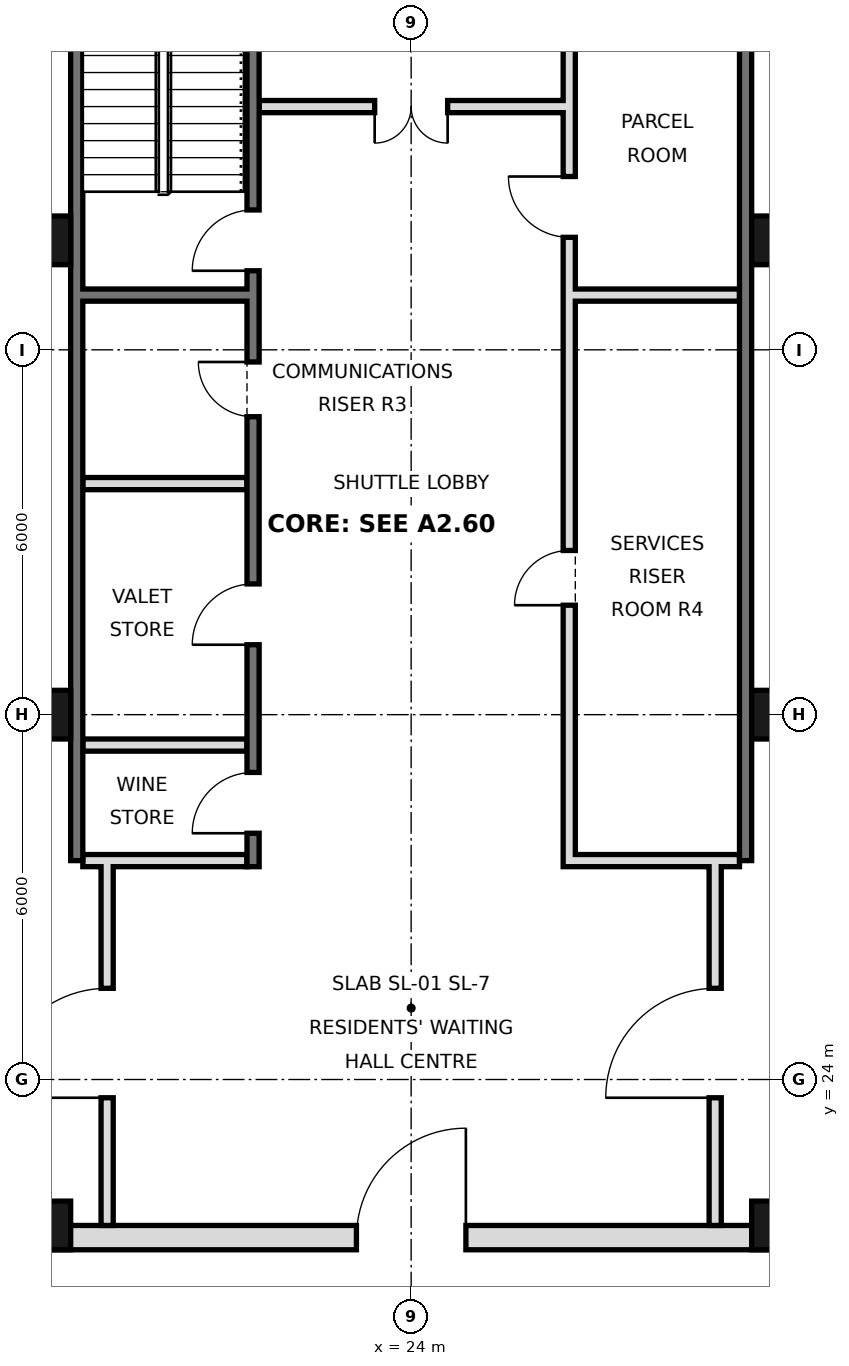
"""IFC4 building model, lengths in metres.
Left out: names, types, materials, properties, quantities, classifications, styles, units other than length and angle.
Written with IfcOpenShell. Run it as: python <this file> out.ifc"""

import sys

from ifc_helpers import new_model, si_unit, direction, frame, frame_2d, origin, origin_2d, place, context, subcontext, project, spatial, rectangle, hollow_rectangle, extrude, element, fill, save


model = new_model("IFC4")
c1 = context("Model", 3, precision=1e-05, world=origin(), true_north=direction((0.0, 1.0)))
c2 = subcontext(c1, "Body", "Model", "MODEL_VIEW")
j1 = project(units=[si_unit("LENGTHUNIT", "METRE"), si_unit("PLANEANGLEUNIT", "RADIAN")], contexts=[c1])
p1 = place(None, origin())
s1 = spatial("IfcSite", under=j1, at=p1, CompositionType="ELEMENT")
p2 = place(p1, origin())
s2 = spatial("IfcBuilding", under=s1, at=p2, CompositionType="ELEMENT")
p3 = place(p2, frame((0.0, 0.0, 239.6)))
s3 = spatial("IfcBuildingStorey", under=s2, at=p3, CompositionType="ELEMENT", Elevation=239.6)
for number, where, z_axis, x_axis in (
    (1, (18.0, 21.6, 0.0), (0.0, 0.0, 1.0), (1.0, 0.0, 0.0)),
    (2, (18.0, 30.0, 0.0), (0.0, 0.0, 1.0), (1.0, 0.0, 0.0)),
    (3, (18.0, 37.8, 0.0), (0.0, 0.0, 1.0), (1.0, 0.0, 0.0)),
    (4, (30.0, 21.6, 0.0), (0.0, 0.0, 1.0), (1.0, 0.0, 0.0)),
    (5, (30.0, 30.0, 0.0), (0.0, 0.0, 1.0), (1.0, 0.0, 0.0)),
    (6, (30.0, 37.8, 0.0), (0.0, 0.0, 1.0), (1.0, 0.0, 0.0)),
):
    element("IfcColumn", number, at=place(p3, frame(where, z_axis=z_axis, x_axis=x_axis)), inside=s3, PredefinedType="COLUMN", context=c2, shape_type="SweptSolid", body=[
        extrude(hollow_rectangle(XDim=0.8, YDim=0.8, WallThickness=0.04, at=origin_2d()), origin(), (0.0, 0.0, 1.0), 3.6),
    ])
for number, where, z_axis, x_axis in (
    (7, (18.5, 27.6, 0.0), (0.0, 0.0, 1.0), (0.0, 1.0, 0.0)),
    (8, (29.5, 27.6, 0.0), (0.0, 0.0, 1.0), (0.0, 1.0, 0.0)),
):
    element("IfcWall", number, at=place(p3, frame(where, z_axis=z_axis, x_axis=x_axis)), inside=s3, PredefinedType="SOLIDWALL", context=c2, shape_type="SweptSolid", body=[
        extrude(rectangle(XDim=17.5, YDim=0.2, at=frame_2d((8.75, 0.0))), origin(), (0.0, 0.0, 1.0), 3.42),
    ])
p4 = place(p3, frame((5.6, 21.4, 0.0), z_axis=(0.0, 0.0, 1.0), x_axis=(1.0, 0.0, 0.0)))
e9 = element("IfcWall", 9, at=p4, inside=s3, PredefinedType="SOLIDWALL", context=c2, shape_type="SweptSolid", body=[
    extrude(rectangle(XDim=36.8, YDim=0.4, at=frame_2d((18.4, 0.0))), origin(), (0.0, 0.0, 1.0), 3.42),
])
p5 = place(p4, frame((8.5, 0.0, 0.0)))
e10 = element("IfcOpeningElement", 10, at=p5, cuts=e9, PredefinedType="OPENING", context=c2, shape_type="SweptSolid", body=[
    extrude(rectangle(XDim=1.8, YDim=2.1, at=frame_2d((0.9, 1.05))), frame((0.0, 0.21, 0.0), z_axis=(0.0, -1.0, 0.0), x_axis=(1.0, 0.0, 0.0)), (0.0, 0.0, 1.0), 0.42),
])
p6 = place(p4, frame((17.5, 0.0, 0.0)))
e11 = element("IfcOpeningElement", 11, at=p6, cuts=e9, PredefinedType="OPENING", context=c2, shape_type="SweptSolid", body=[
    extrude(rectangle(XDim=1.8, YDim=2.1, at=frame_2d((0.9, 1.05))), frame((0.0, 0.21, 0.0), z_axis=(0.0, -1.0, 0.0), x_axis=(1.0, 0.0, 0.0)), (0.0, 0.0, 1.0), 0.42),
])
p7 = place(p4, frame((26.5, 0.0, 0.0)))
e12 = element("IfcOpeningElement", 12, at=p7, cuts=e9, PredefinedType="OPENING", context=c2, shape_type="SweptSolid", body=[
    extrude(rectangle(XDim=1.8, YDim=2.1, at=frame_2d((0.9, 1.05))), frame((0.0, 0.21, 0.0), z_axis=(0.0, -1.0, 0.0), x_axis=(1.0, 0.0, 0.0)), (0.0, 0.0, 1.0), 0.42),
])
p8 = place(p4, frame((4.5, 0.0, 0.0)))
e13 = element("IfcOpeningElement", 13, at=p8, cuts=e9, PredefinedType="OPENING", context=c2, shape_type="SweptSolid", body=[
    extrude(rectangle(XDim=1.2, YDim=2.1, at=frame_2d((0.6, 1.05))), frame((0.0, 0.21, 0.0), z_axis=(0.0, -1.0, 0.0), x_axis=(1.0, 0.0, 0.0)), (0.0, 0.0, 1.0), 0.42),
])
p9 = place(p4, frame((31.1, 0.0, 0.0)))
e14 = element("IfcOpeningElement", 14, at=p9, cuts=e9, PredefinedType="OPENING", context=c2, shape_type="SweptSolid", body=[
    extrude(rectangle(XDim=1.2, YDim=2.1, at=frame_2d((0.6, 1.05))), frame((0.0, 0.21, 0.0), z_axis=(0.0, -1.0, 0.0), x_axis=(1.0, 0.0, 0.0)), (0.0, 0.0, 1.0), 0.42),
])
p10 = place(p3, frame((19.0, 21.6, 0.0), z_axis=(0.0, 0.0, 1.0), x_axis=(0.0, 1.0, 0.0)))
e15 = element("IfcWall", 15, at=p10, inside=s3, PredefinedType="PARTITIONING", context=c2, shape_type="SweptSolid", body=[
    extrude(rectangle(XDim=6.0, YDim=0.2, at=frame_2d((3.0, 0.0))), origin(), (0.0, 0.0, 1.0), 3.42),
])
p11 = place(p10, frame((2.1, 0.0, 0.0)))
e16 = element("IfcOpeningElement", 16, at=p11, cuts=e15, PredefinedType="OPENING", context=c2, shape_type="SweptSolid", body=[
    extrude(rectangle(XDim=1.8, YDim=2.1, at=frame_2d((0.9, 1.05))), frame((0.0, 0.11, 0.0), z_axis=(0.0, -1.0, 0.0), x_axis=(1.0, 0.0, 0.0)), (0.0, 0.0, 1.0), 0.22),
])
p12 = place(p3, frame((29.0, 21.6, 0.0), z_axis=(0.0, 0.0, 1.0), x_axis=(0.0, 1.0, 0.0)))
e17 = element("IfcWall", 17, at=p12, inside=s3, PredefinedType="PARTITIONING", context=c2, shape_type="SweptSolid", body=[
    extrude(rectangle(XDim=6.0, YDim=0.2, at=frame_2d((3.0, 0.0))), origin(), (0.0, 0.0, 1.0), 3.42),
])
p13 = place(p12, frame((2.1, 0.0, 0.0)))
e18 = element("IfcOpeningElement", 18, at=p13, cuts=e17, PredefinedType="OPENING", context=c2, shape_type="SweptSolid", body=[
    extrude(rectangle(XDim=1.8, YDim=2.1, at=frame_2d((0.9, 1.05))), frame((0.0, 0.11, 0.0), z_axis=(0.0, -1.0, 0.0), x_axis=(1.0, 0.0, 0.0)), (0.0, 0.0, 1.0), 0.22),
])
p14 = place(p3, frame((21.4, 27.5, 0.0), z_axis=(0.0, 0.0, 1.0), x_axis=(0.0, 1.0, 0.0)))
e19 = element("IfcWall", 19, at=p14, inside=s3, PredefinedType="SOLIDWALL", context=c2, shape_type="SweptSolid", body=[
    extrude(rectangle(XDim=17.5, YDim=0.2, at=frame_2d((8.75, 0.0))), origin(), (0.0, 0.0, 1.0), 3.42),
])
p15 = place(p14, frame((0.55, 0.0, 0.0)))
e20 = element("IfcOpeningElement", 20, at=p15, cuts=e19, PredefinedType="OPENING", context=c2, shape_type="SweptSolid", body=[
    extrude(rectangle(XDim=1.0, YDim=2.1, at=frame_2d((0.5, 1.05))), frame((0.0, 0.11, 0.0), z_axis=(0.0, -1.0, 0.0), x_axis=(1.0, 0.0, 0.0)), (0.0, 0.0, 1.0), 0.22),
])
p16 = place(p14, frame((3.65, 0.0, 0.0)))
e21 = element("IfcOpeningElement", 21, at=p16, cuts=e19, PredefinedType="OPENING", context=c2, shape_type="SweptSolid", body=[
    extrude(rectangle(XDim=1.0, YDim=2.1, at=frame_2d((0.5, 1.05))), frame((0.0, 0.11, 0.0), z_axis=(0.0, -1.0, 0.0), x_axis=(1.0, 0.0, 0.0)), (0.0, 0.0, 1.0), 0.22),
])
p17 = place(p14, frame((9.8, 0.0, 0.0)))
e22 = element("IfcOpeningElement", 22, at=p17, cuts=e19, PredefinedType="OPENING", context=c2, shape_type="SweptSolid", body=[
    extrude(rectangle(XDim=1.0, YDim=2.1, at=frame_2d((0.5, 1.05))), frame((0.0, 0.11, 0.0), z_axis=(0.0, -1.0, 0.0), x_axis=(1.0, 0.0, 0.0)), (0.0, 0.0, 1.0), 0.22),
])
p18 = place(p14, frame((7.4, 0.0, 0.0)))
e23 = element("IfcOpeningElement", 23, at=p18, cuts=e19, PredefinedType="OPENING", context=c2, shape_type="SweptSolid", body=[
    extrude(rectangle(XDim=0.9, YDim=2.1, at=frame_2d((0.45, 1.05))), frame((0.0, 0.11, 0.0), z_axis=(0.0, -1.0, 0.0), x_axis=(1.0, 0.0, 0.0)), (0.0, 0.0, 1.0), 0.22),
])
p19 = place(p3, frame((26.6, 27.5, 0.0), z_axis=(0.0, 0.0, 1.0), x_axis=(0.0, 1.0, 0.0)))
e24 = element("IfcWall", 24, at=p19, inside=s3, PredefinedType="SOLIDWALL", context=c2, shape_type="SweptSolid", body=[
    extrude(rectangle(XDim=17.5, YDim=0.2, at=frame_2d((8.75, 0.0))), origin(), (0.0, 0.0, 1.0), 3.42),
])
p20 = place(p19, frame((4.3, 0.0, 0.0)))
e25 = element("IfcOpeningElement", 25, at=p20, cuts=e24, PredefinedType="OPENING", context=c2, shape_type="SweptSolid", body=[
    extrude(rectangle(XDim=0.9, YDim=2.1, at=frame_2d((0.45, 1.05))), frame((0.0, 0.11, 0.0), z_axis=(0.0, -1.0, 0.0), x_axis=(1.0, 0.0, 0.0)), (0.0, 0.0, 1.0), 0.22),
])
p21 = place(p19, frame((10.35, 0.0, 0.0)))
e26 = element("IfcOpeningElement", 26, at=p21, cuts=e24, PredefinedType="OPENING", context=c2, shape_type="SweptSolid", body=[
    extrude(rectangle(XDim=1.0, YDim=2.1, at=frame_2d((0.5, 1.05))), frame((0.0, 0.11, 0.0), z_axis=(0.0, -1.0, 0.0), x_axis=(1.0, 0.0, 0.0)), (0.0, 0.0, 1.0), 0.22),
])
p22 = place(p19, frame((15.475, 0.0, 0.0)))
e27 = element("IfcOpeningElement", 27, at=p22, cuts=e24, PredefinedType="OPENING", context=c2, shape_type="SweptSolid", body=[
    extrude(rectangle(XDim=1.0, YDim=2.1, at=frame_2d((0.5, 1.05))), frame((0.0, 0.11, 0.0), z_axis=(0.0, -1.0, 0.0), x_axis=(1.0, 0.0, 0.0)), (0.0, 0.0, 1.0), 0.22),
])
p23 = place(p3, frame((18.6, 27.6, 0.0), z_axis=(0.0, 0.0, 1.0), x_axis=(1.0, 0.0, 0.0)))
e28 = element("IfcWall", 28, at=p23, inside=s3, PredefinedType="PARTITIONING", context=c2, shape_type="SweptSolid", body=[
    extrude(rectangle(XDim=2.7, YDim=0.2, at=frame_2d((1.35, 0.0))), origin(), (0.0, 0.0, 1.0), 3.42),
])
p24 = place(p3, frame((26.7, 27.6, 0.0), z_axis=(0.0, 0.0, 1.0), x_axis=(1.0, 0.0, 0.0)))
e29 = element("IfcWall", 29, at=p24, inside=s3, PredefinedType="SOLIDWALL", context=c2, shape_type="SweptSolid", body=[
    extrude(rectangle(XDim=2.7, YDim=0.2, at=frame_2d((1.35, 0.0))), origin(), (0.0, 0.0, 1.0), 3.42),
])
p25 = place(p3, frame((18.6, 29.5, 0.0), z_axis=(0.0, 0.0, 1.0), x_axis=(1.0, 0.0, 0.0)))
e30 = element("IfcWall", 30, at=p25, inside=s3, PredefinedType="PARTITIONING", context=c2, shape_type="SweptSolid", body=[
    extrude(rectangle(XDim=2.7, YDim=0.2, at=frame_2d((1.35, 0.0))), origin(), (0.0, 0.0, 1.0), 3.42),
])
for number, where, z_axis, x_axis in (
    (31, (18.6, 33.8, 0.0), (0.0, 0.0, 1.0), (1.0, 0.0, 0.0)),
    (32, (18.6, 36.9, 0.0), (0.0, 0.0, 1.0), (1.0, 0.0, 0.0)),
    (33, (26.7, 36.9, 0.0), (0.0, 0.0, 1.0), (1.0, 0.0, 0.0)),
):
    element("IfcWall", number, at=place(p3, frame(where, z_axis=z_axis, x_axis=x_axis)), inside=s3, PredefinedType="SOLIDWALL", context=c2, shape_type="SweptSolid", body=[
        extrude(rectangle(XDim=2.7, YDim=0.2, at=frame_2d((1.35, 0.0))), origin(), (0.0, 0.0, 1.0), 3.42),
    ])
p26 = place(p3, frame((21.5, 40.0, 0.0), z_axis=(0.0, 0.0, 1.0), x_axis=(1.0, 0.0, 0.0)))
e34 = element("IfcWall", 34, at=p26, inside=s3, PredefinedType="PARTITIONING", context=c2, shape_type="SweptSolid", body=[
    extrude(rectangle(XDim=5.0, YDim=0.2, at=frame_2d((2.5, 0.0))), origin(), (0.0, 0.0, 1.0), 3.42),
])
p27 = place(p26, frame((1.9, 0.0, 0.0)))
e35 = element("IfcOpeningElement", 35, at=p27, cuts=e34, PredefinedType="OPENING", context=c2, shape_type="SweptSolid", body=[
    extrude(rectangle(XDim=1.2, YDim=2.1, at=frame_2d((0.6, 1.05))), frame((0.0, 0.11, 0.0), z_axis=(0.0, -1.0, 0.0), x_axis=(1.0, 0.0, 0.0)), (0.0, 0.0, 1.0), 0.22),
])
p28 = place(p11, origin())
e36 = element("IfcDoor", 36, at=p28, inside=s3, OperationType="SINGLE_SWING_LEFT", PredefinedType="DOOR", context=c2, shape_type="SweptSolid", body=[
    extrude(rectangle(XDim=1.8, YDim=2.1, at=frame_2d((0.9, 1.05))), frame((0.0, 0.025, 0.0), z_axis=(0.0, -1.0, 0.0), x_axis=(1.0, 0.0, 0.0)), (0.0, 0.0, 1.0), 0.05),
])
fill(e16, e36)
p29 = place(p6, frame((1.8, 0.0, 0.0), z_axis=(0.0, 0.0, 1.0), x_axis=(-1.0, 0.0, 0.0)))
e37 = element("IfcDoor", 37, at=p29, inside=s3, OperationType="SINGLE_SWING_LEFT", PredefinedType="DOOR", context=c2, shape_type="SweptSolid", body=[
    extrude(rectangle(XDim=1.8, YDim=2.1, at=frame_2d((0.9, 1.05))), frame((0.0, 0.025, 0.0), z_axis=(0.0, -1.0, 0.0), x_axis=(1.0, 0.0, 0.0)), (0.0, 0.0, 1.0), 0.05),
])
fill(e11, e37)
p30 = place(p13, origin())
e38 = element("IfcDoor", 38, at=p30, inside=s3, OperationType="SINGLE_SWING_LEFT", PredefinedType="DOOR", context=c2, shape_type="SweptSolid", body=[
    extrude(rectangle(XDim=1.8, YDim=2.1, at=frame_2d((0.9, 1.05))), frame((0.0, 0.025, 0.0), z_axis=(0.0, -1.0, 0.0), x_axis=(1.0, 0.0, 0.0)), (0.0, 0.0, 1.0), 0.05),
])
fill(e18, e38)
p31 = place(p27, frame((1.2, 0.0, 0.0), z_axis=(0.0, 0.0, 1.0), x_axis=(-1.0, 0.0, 0.0)))
e39 = element("IfcDoor", 39, at=p31, inside=s3, OperationType="DOUBLE_DOOR_SINGLE_SWING", PredefinedType="DOOR", context=c2, shape_type="SweptSolid", body=[
    extrude(rectangle(XDim=1.2, YDim=2.1, at=frame_2d((0.6, 1.05))), frame((0.0, 0.025, 0.0), z_axis=(0.0, -1.0, 0.0), x_axis=(1.0, 0.0, 0.0)), (0.0, 0.0, 1.0), 0.05),
])
fill(e35, e39)
p32 = place(p15, origin())
e40 = element("IfcDoor", 40, at=p32, inside=s3, OperationType="SINGLE_SWING_LEFT", PredefinedType="DOOR", context=c2, shape_type="SweptSolid", body=[
    extrude(rectangle(XDim=1.0, YDim=2.1, at=frame_2d((0.5, 1.05))), frame((0.0, 0.025, 0.0), z_axis=(0.0, -1.0, 0.0), x_axis=(1.0, 0.0, 0.0)), (0.0, 0.0, 1.0), 0.05),
])
fill(e20, e40)
p33 = place(p16, origin())
e41 = element("IfcDoor", 41, at=p33, inside=s3, OperationType="SINGLE_SWING_LEFT", PredefinedType="DOOR", context=c2, shape_type="SweptSolid", body=[
    extrude(rectangle(XDim=1.0, YDim=2.1, at=frame_2d((0.5, 1.05))), frame((0.0, 0.025, 0.0), z_axis=(0.0, -1.0, 0.0), x_axis=(1.0, 0.0, 0.0)), (0.0, 0.0, 1.0), 0.05),
])
fill(e21, e41)
p34 = place(p17, origin())
e42 = element("IfcDoor", 42, at=p34, inside=s3, OperationType="SINGLE_SWING_LEFT", PredefinedType="DOOR", context=c2, shape_type="SweptSolid", body=[
    extrude(rectangle(XDim=1.0, YDim=2.1, at=frame_2d((0.5, 1.05))), frame((0.0, 0.025, 0.0), z_axis=(0.0, -1.0, 0.0), x_axis=(1.0, 0.0, 0.0)), (0.0, 0.0, 1.0), 0.05),
])
fill(e22, e42)
p35 = place(p18, frame((0.9, 0.0, 0.0), z_axis=(0.0, 0.0, 1.0), x_axis=(-1.0, 0.0, 0.0)))
e43 = element("IfcDoor", 43, at=p35, inside=s3, OperationType="SINGLE_SWING_LEFT", PredefinedType="DOOR", context=c2, shape_type="SweptSolid", body=[
    extrude(rectangle(XDim=0.9, YDim=2.1, at=frame_2d((0.45, 1.05))), frame((0.0, 0.025, 0.0), z_axis=(0.0, -1.0, 0.0), x_axis=(1.0, 0.0, 0.0)), (0.0, 0.0, 1.0), 0.05),
])
fill(e23, e43)
p36 = place(p20, origin())
e44 = element("IfcDoor", 44, at=p36, inside=s3, OperationType="SINGLE_SWING_LEFT", PredefinedType="DOOR", context=c2, shape_type="SweptSolid", body=[
    extrude(rectangle(XDim=0.9, YDim=2.1, at=frame_2d((0.45, 1.05))), frame((0.0, 0.025, 0.0), z_axis=(0.0, -1.0, 0.0), x_axis=(1.0, 0.0, 0.0)), (0.0, 0.0, 1.0), 0.05),
])
fill(e25, e44)
p37 = place(p21, frame((1.0, 0.0, 0.0), z_axis=(0.0, 0.0, 1.0), x_axis=(-1.0, 0.0, 0.0)))
e45 = element("IfcDoor", 45, at=p37, inside=s3, OperationType="SINGLE_SWING_LEFT", PredefinedType="DOOR", context=c2, shape_type="SweptSolid", body=[
    extrude(rectangle(XDim=1.0, YDim=2.1, at=frame_2d((0.5, 1.05))), frame((0.0, 0.025, 0.0), z_axis=(0.0, -1.0, 0.0), x_axis=(1.0, 0.0, 0.0)), (0.0, 0.0, 1.0), 0.05),
])
fill(e26, e45)
save(model, sys.argv[1])
